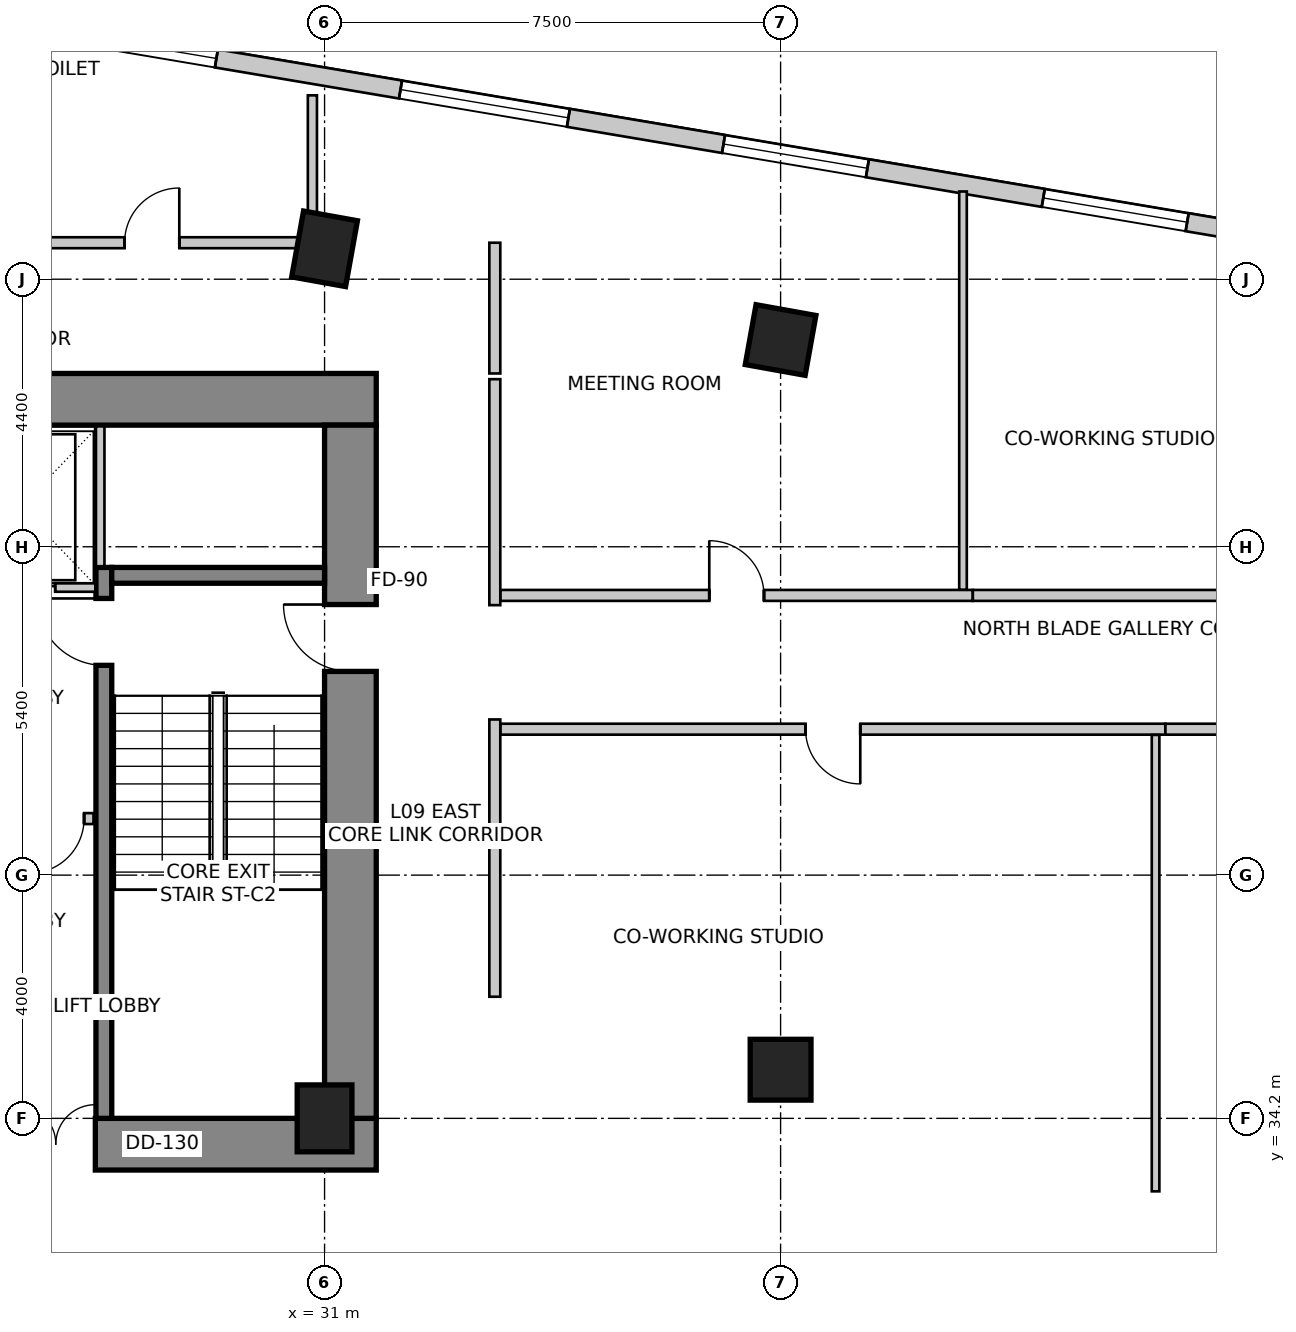
"""IFC4 building model, lengths in metres.
Left out: names, types, materials, properties, quantities, classifications, styles, units other than length and angle.
Written with IfcOpenShell. Run it as: python <this file> out.ifc"""

import sys

from ifc_helpers import new_model, si_unit, direction, frame, frame_2d, origin, origin_2d, place, context, subcontext, project, spatial, rectangle, extrude, source, transform, mapped, element, fill, save


model = new_model("IFC4")
c1 = context("Model", 3, precision=1e-05, world=origin(), true_north=direction((0.0, 1.0)))
c2 = subcontext(c1, "Body", "Model", "MODEL_VIEW")
j1 = project(units=[si_unit("LENGTHUNIT", "METRE"), si_unit("PLANEANGLEUNIT", "RADIAN")], contexts=[c1])
p1 = place(None, origin())
s1 = spatial("IfcSite", under=j1, at=p1, CompositionType="ELEMENT")
p2 = place(p1, origin())
s2 = spatial("IfcBuilding", under=s1, at=p2, CompositionType="ELEMENT")
p3 = place(p2, frame((0.0, 0.0, 39.0)))
s3 = spatial("IfcBuildingStorey", under=s2, at=p3, CompositionType="ELEMENT", Elevation=39.0)
p4 = place(p3, frame((15.75, 46.025, 0.0), z_axis=(0.0, 0.0, 1.0), x_axis=(1.0, 0.0, 0.0)))
e1 = element("IfcWall", 1, at=p4, inside=s3, PredefinedType="SHEAR", context=c2, shape_type="SweptSolid", body=[
    extrude(rectangle(XDim=16.1, YDim=0.85, at=frame_2d((8.05, 0.0))), origin(), (0.0, 0.0, 1.0), 4.0),
])
p5 = place(p3, frame((15.75, 33.775, 0.0), z_axis=(0.0, 0.0, 1.0), x_axis=(1.0, 0.0, 0.0)))
e2 = element("IfcWall", 2, at=p5, inside=s3, PredefinedType="SHEAR", context=c2, shape_type="SweptSolid", body=[
    extrude(rectangle(XDim=16.1, YDim=0.85, at=frame_2d((8.05, 0.0))), origin(), (0.0, 0.0, 1.0), 4.0),
])
m1 = source(origin(), c2, "Body", "SweptSolid", [
    extrude(rectangle(XDim=1.3, YDim=2.15, at=frame_2d((0.65, 1.075))), frame((0.0, 0.435, 0.0), z_axis=(0.0, -1.0, 0.0), x_axis=(1.0, 0.0, 0.0)), (0.0, 0.0, 1.0), 0.87),
])
p6 = place(p5, frame((10.18, 0.0, 0.0)))
e3 = element("IfcOpeningElement", 3, at=p6, cuts=e2, PredefinedType="OPENING", context=c2, shape_type="MappedRepresentation", body=[
    mapped(m1, transform((0.0, 0.0, 0.0), scale=1.0)),
])
p7 = place(p3, frame((31.425, 34.2, 0.0), z_axis=(0.0, 0.0, 1.0), x_axis=(0.0, 1.0, 0.0)))
e4 = element("IfcWall", 4, at=p7, inside=s3, PredefinedType="SHEAR", context=c2, shape_type="SweptSolid", body=[
    extrude(rectangle(XDim=11.4, YDim=0.85, at=frame_2d((5.7, 0.0))), origin(), (0.0, 0.0, 1.0), 4.0),
])
m2 = source(origin(), c2, "Body", "SweptSolid", [
    extrude(rectangle(XDim=1.1, YDim=2.15, at=frame_2d((0.55, 1.075))), frame((0.0, 0.435, 0.0), z_axis=(0.0, -1.0, 0.0), x_axis=(1.0, 0.0, 0.0)), (0.0, 0.0, 1.0), 0.87),
])
p8 = place(p7, frame((7.35, 0.0, 0.0)))
e5 = element("IfcOpeningElement", 5, at=p8, cuts=e4, PredefinedType="OPENING", context=c2, shape_type="MappedRepresentation", body=[
    mapped(m2, transform((0.0, 0.0, 0.0), scale=1.0)),
])
p9 = place(p3, frame((27.37, 34.2, 0.0), z_axis=(0.0, 0.0, 1.0), x_axis=(0.0, 1.0, 0.0)))
e6 = element("IfcWall", 6, at=p9, inside=s3, PredefinedType="SHEAR", context=c2, shape_type="SweptSolid", body=[
    extrude(rectangle(XDim=9.06, YDim=0.26, at=frame_2d((4.53, 0.0))), origin(), (0.0, 0.0, 1.0), 4.0),
])
m3 = source(origin(), c2, "Body", "SweptSolid", [
    extrude(rectangle(XDim=1.1, YDim=2.15, at=frame_2d((0.55, 1.075))), frame((0.0, 0.14, 0.0), z_axis=(0.0, -1.0, 0.0), x_axis=(1.0, 0.0, 0.0)), (0.0, 0.0, 1.0), 0.28),
])
p10 = place(p9, frame((7.45, 0.0, 0.0)))
e7 = element("IfcOpeningElement", 7, at=p10, cuts=e6, PredefinedType="OPENING", context=c2, shape_type="MappedRepresentation", body=[
    mapped(m3, transform((0.0, 0.0, 0.0), scale=1.0)),
])
p11 = place(p3, frame((27.5, 43.13, 0.0), z_axis=(0.0, 0.0, 1.0), x_axis=(1.0, 0.0, 0.0)))
e8 = element("IfcWall", 8, at=p11, inside=s3, PredefinedType="SHEAR", context=c2, shape_type="SweptSolid", body=[
    extrude(rectangle(XDim=3.5, YDim=0.26, at=frame_2d((1.75, 0.0))), origin(), (0.0, 0.0, 1.0), 4.0),
])
m4 = source(origin(), c2, "Body", "SweptSolid", [
    extrude(rectangle(XDim=0.9, YDim=1.1, at=origin_2d()), origin(), (0.0, 0.0, 1.0), 4.0),
])
p12 = place(p3, frame((31.0, 48.5, 0.0), z_axis=(0.0, 0.0, 1.0), x_axis=(0.984195607969, -0.17708474032, 0.0)))
e9 = element("IfcColumn", 9, at=p12, inside=s3, PredefinedType="COLUMN", context=c2, shape_type="MappedRepresentation", body=[
    mapped(m4, transform((0.0, 0.0, 0.0), scale=1.0)),
])
m5 = source(origin(), c2, "Body", "SweptSolid", [
    extrude(rectangle(XDim=1.0, YDim=1.0, at=origin_2d()), origin(), (0.0, 0.0, 1.0), 4.0),
])
p13 = place(p3, frame((38.5, 47.0, 0.0), z_axis=(0.0, 0.0, 1.0), x_axis=(0.984195607969, -0.17708474032, 0.0)))
e10 = element("IfcColumn", 10, at=p13, inside=s3, PredefinedType="COLUMN", context=c2, shape_type="MappedRepresentation", body=[
    mapped(m5, transform((0.0, 0.0, 0.0), scale=1.0)),
])
p14 = place(p3, frame((31.0, 34.2, 0.0), z_axis=(0.0, 0.0, 1.0), x_axis=(1.0, 0.0, 0.0)))
e11 = element("IfcColumn", 11, at=p14, inside=s3, PredefinedType="COLUMN", context=c2, shape_type="MappedRepresentation", body=[
    mapped(m4, transform((0.0, 0.0, 0.0), scale=1.0)),
])
p15 = place(p3, frame((38.5, 35.0, 0.0), z_axis=(0.0, 0.0, 1.0), x_axis=(1.0, 0.0, 0.0)))
e12 = element("IfcColumn", 12, at=p15, inside=s3, PredefinedType="COLUMN", context=c2, shape_type="MappedRepresentation", body=[
    mapped(m5, transform((0.0, 0.0, 0.0), scale=1.0)),
])
p16 = place(p3, frame((58.761, 46.648, 0.0), z_axis=(0.0, 0.0, 1.0), x_axis=(-0.98607502735, 0.166301053624, 0.0)))
e13 = element("IfcWall", 13, at=p16, inside=s3, PredefinedType="SOLIDWALL", context=c2, shape_type="SweptSolid", body=[
    extrude(rectangle(XDim=37.397, YDim=0.3, at=frame_2d((18.699, 0.0))), origin(), (0.0, 0.0, 1.0), 3.75),
])
m6 = source(origin(), c2, "Body", "SweptSolid", [
    extrude(rectangle(XDim=2.1, YDim=2.0, at=frame_2d((1.05, 1.0))), frame((0.0, 0.16, 0.0), z_axis=(0.0, -1.0, 0.0), x_axis=(1.0, 0.0, 0.0)), (0.0, 0.0, 1.0), 0.32),
])
p17 = place(p16, frame((0.626, 0.0, 0.85)))
e14 = element("IfcOpeningElement", 14, at=p17, cuts=e13, PredefinedType="OPENING", context=c2, shape_type="MappedRepresentation", body=[
    mapped(m6, transform((0.0, 0.0, 0.0), scale=1.0)),
])
m7 = source(origin(), c2, "Body", "SweptSolid", [
    extrude(rectangle(XDim=2.4, YDim=2.2, at=frame_2d((1.2, 1.1))), frame((0.0, 0.16, 0.0), z_axis=(0.0, -1.0, 0.0), x_axis=(1.0, 0.0, 0.0)), (0.0, 0.0, 1.0), 0.32),
])
p18 = place(p16, frame((4.571, 0.0, 0.85)))
e15 = element("IfcOpeningElement", 15, at=p18, cuts=e13, PredefinedType="OPENING", context=c2, shape_type="MappedRepresentation", body=[
    mapped(m7, transform((0.0, 0.0, 0.0), scale=1.0)),
])
m8 = source(origin(), c2, "Body", "SweptSolid", [
    extrude(rectangle(XDim=2.8, YDim=2.4, at=frame_2d((1.4, 1.2))), frame((0.0, 0.16, 0.0), z_axis=(0.0, -1.0, 0.0), x_axis=(1.0, 0.0, 0.0)), (0.0, 0.0, 1.0), 0.32),
])
p19 = place(p16, frame((8.969, 0.0, 0.85)))
e16 = element("IfcOpeningElement", 16, at=p19, cuts=e13, PredefinedType="OPENING", context=c2, shape_type="MappedRepresentation", body=[
    mapped(m8, transform((0.0, 0.0, 0.0), scale=1.0)),
])
p20 = place(p16, frame((13.766, 0.0, 0.85)))
e17 = element("IfcOpeningElement", 17, at=p20, cuts=e13, PredefinedType="OPENING", context=c2, shape_type="MappedRepresentation", body=[
    mapped(m7, transform((0.0, 0.0, 0.0), scale=1.0)),
])
p21 = place(p16, frame((19.099, 0.0, 0.85)))
e18 = element("IfcOpeningElement", 18, at=p21, cuts=e13, PredefinedType="OPENING", context=c2, shape_type="MappedRepresentation", body=[
    mapped(m7, transform((0.0, 0.0, 0.0), scale=1.0)),
])
p22 = place(p16, frame((24.086, 0.0, 0.85)))
e19 = element("IfcOpeningElement", 19, at=p22, cuts=e13, PredefinedType="OPENING", context=c2, shape_type="MappedRepresentation", body=[
    mapped(m8, transform((0.0, 0.0, 0.0), scale=1.0)),
])
p23 = place(p16, frame((29.957, 0.0, 0.85)))
e20 = element("IfcOpeningElement", 20, at=p23, cuts=e13, PredefinedType="OPENING", context=c2, shape_type="MappedRepresentation", body=[
    mapped(m7, transform((0.0, 0.0, 0.0), scale=1.0)),
])
p24 = place(p16, frame((34.456, 0.0, 0.85)))
e21 = element("IfcOpeningElement", 21, at=p24, cuts=e13, PredefinedType="OPENING", context=c2, shape_type="MappedRepresentation", body=[
    mapped(m7, transform((0.0, 0.0, 0.0), scale=1.0)),
])
p25 = place(p3, frame((20.37, 42.93, 0.0), z_axis=(0.0, 0.0, 1.0), x_axis=(1.0, 0.0, 0.0)))
e22 = element("IfcWall", 22, at=p25, inside=s3, PredefinedType="SOLIDWALL", context=c2, shape_type="SweptSolid", body=[
    extrude(rectangle(XDim=6.86, YDim=0.14, at=frame_2d((3.43, 0.0))), origin(), (0.0, 0.0, 1.0), 3.75),
])
m9 = source(origin(), c2, "Body", "SweptSolid", [
    extrude(rectangle(XDim=1.1, YDim=2.15, at=frame_2d((0.55, 1.075))), frame((0.0, 0.08, 0.0), z_axis=(0.0, -1.0, 0.0), x_axis=(1.0, 0.0, 0.0)), (0.0, 0.0, 1.0), 0.16),
])
p26 = place(p25, frame((0.5, 0.0, 0.0)))
e23 = element("IfcOpeningElement", 23, at=p26, cuts=e22, PredefinedType="OPENING", context=c2, shape_type="MappedRepresentation", body=[
    mapped(m9, transform((0.0, 0.0, 0.0), scale=1.0)),
])
p27 = place(p25, frame((2.7, 0.0, 0.0)))
e24 = element("IfcOpeningElement", 24, at=p27, cuts=e22, PredefinedType="OPENING", context=c2, shape_type="MappedRepresentation", body=[
    mapped(m9, transform((0.0, 0.0, 0.0), scale=1.0)),
])
p28 = place(p25, frame((5.1, 0.0, 0.0)))
e25 = element("IfcOpeningElement", 25, at=p28, cuts=e22, PredefinedType="OPENING", context=c2, shape_type="MappedRepresentation", body=[
    mapped(m9, transform((0.0, 0.0, 0.0), scale=1.0)),
])
p29 = place(p3, frame((27.31, 43.28, 0.0), z_axis=(0.0, 0.0, 1.0), x_axis=(0.0, 1.0, 0.0)))
e26 = element("IfcWall", 26, at=p29, inside=s3, PredefinedType="SOLIDWALL", context=c2, shape_type="SweptSolid", body=[
    extrude(rectangle(XDim=2.3, YDim=0.14, at=frame_2d((1.15, 0.0))), origin(), (0.0, 0.0, 1.0), 3.75),
])
p30 = place(p3, frame((27.2, 39.13, 0.0), z_axis=(0.0, 0.0, 1.0), x_axis=(-1.0, 0.0, 0.0)))
e27 = element("IfcWall", 27, at=p30, inside=s3, PredefinedType="PARTITIONING", context=c2, shape_type="SweptSolid", body=[
    extrude(rectangle(XDim=1.21, YDim=0.18, at=frame_2d((0.605, 0.0))), origin(), (0.0, 0.0, 1.0), 3.75),
])
m10 = source(origin(), c2, "Body", "SweptSolid", [
    extrude(rectangle(XDim=0.9, YDim=2.15, at=frame_2d((0.45, 1.075))), frame((0.0, 0.1, 0.0), z_axis=(0.0, -1.0, 0.0), x_axis=(1.0, 0.0, 0.0)), (0.0, 0.0, 1.0), 0.2),
])
p31 = place(p30, frame((0.155, 0.0, 0.0)))
e28 = element("IfcOpeningElement", 28, at=p31, cuts=e27, PredefinedType="OPENING", context=c2, shape_type="MappedRepresentation", body=[
    mapped(m10, transform((0.0, 0.0, 0.0), scale=1.0)),
])
p32 = place(p3, frame((25.362, 48.6, 0.0), z_axis=(0.0, 0.0, 1.0), x_axis=(1.0, 0.0, 0.0)))
e29 = element("IfcWall", 29, at=p32, inside=s3, PredefinedType="PARTITIONING", context=c2, shape_type="SweptSolid", body=[
    extrude(rectangle(XDim=5.598, YDim=0.18, at=frame_2d((2.799, 0.0))), origin(), (0.0, 0.0, 1.0), 2.892),
])
p33 = place(p32, frame((2.349, 0.0, 0.0)))
e30 = element("IfcOpeningElement", 30, at=p33, cuts=e29, PredefinedType="OPENING", context=c2, shape_type="MappedRepresentation", body=[
    mapped(m10, transform((0.0, 0.0, 0.0), scale=1.0)),
])
p34 = place(p3, frame((33.8, 48.6, 0.0), z_axis=(0.0, 0.0, 1.0), x_axis=(0.0, -1.0, 0.0)))
e31 = element("IfcWall", 31, at=p34, inside=s3, PredefinedType="PARTITIONING", context=c2, shape_type="SweptSolid", body=[
    extrude(rectangle(XDim=2.15, YDim=0.18, at=frame_2d((1.075, 0.0))), origin(), (0.0, 0.0, 1.0), 2.892),
])
p35 = place(p3, frame((33.8, 40.76, 0.0), z_axis=(0.0, 0.0, 1.0), x_axis=(0.0, -1.0, 0.0)))
e32 = element("IfcWall", 32, at=p35, inside=s3, PredefinedType="PARTITIONING", context=c2, shape_type="SweptSolid", body=[
    extrude(rectangle(XDim=4.56, YDim=0.18, at=frame_2d((2.28, 0.0))), origin(), (0.0, 0.0, 1.0), 3.75),
])
p36 = place(p3, frame((33.8, 46.356, 0.0), z_axis=(0.0, 0.0, 1.0), x_axis=(0.0, -1.0, 0.0)))
e33 = element("IfcWall", 33, at=p36, inside=s3, PredefinedType="PARTITIONING", context=c2, shape_type="SweptSolid", body=[
    extrude(rectangle(XDim=3.716, YDim=0.18, at=frame_2d((1.858, 0.0))), origin(), (0.0, 0.0, 1.0), 3.188),
])
p37 = place(p3, frame((44.827, 40.6, 0.0), z_axis=(0.0, 0.0, 1.0), x_axis=(-1.0, 0.0, 0.0)))
e34 = element("IfcWall", 34, at=p37, inside=s3, PredefinedType="PARTITIONING", context=c2, shape_type="SweptSolid", body=[
    extrude(rectangle(XDim=10.933, YDim=0.18, at=frame_2d((5.466, 0.0))), origin(), (0.0, 0.0, 1.0), 3.125),
])
p38 = place(p37, frame((5.017, 0.0, 0.0)))
e35 = element("IfcOpeningElement", 35, at=p38, cuts=e34, PredefinedType="OPENING", context=c2, shape_type="MappedRepresentation", body=[
    mapped(m10, transform((0.0, 0.0, 0.0), scale=1.0)),
])
p39 = place(p3, frame((55.535, 40.6, 0.0), z_axis=(0.0, 0.0, 1.0), x_axis=(-1.0, 0.0, 0.0)))
e36 = element("IfcWall", 36, at=p39, inside=s3, PredefinedType="PARTITIONING", context=c2, shape_type="SweptSolid", body=[
    extrude(rectangle(XDim=10.706, YDim=0.18, at=frame_2d((5.353, 0.0))), origin(), (0.0, 0.0, 1.0), 3.125),
])
p40 = place(p39, frame((4.843, 0.0, 0.0)))
e37 = element("IfcOpeningElement", 37, at=p40, cuts=e36, PredefinedType="OPENING", context=c2, shape_type="MappedRepresentation", body=[
    mapped(m10, transform((0.0, 0.0, 0.0), scale=1.0)),
])
p41 = place(p3, frame((33.894, 42.8, 0.0), z_axis=(0.0, 0.0, 1.0), x_axis=(1.0, 0.0, 0.0)))
e38 = element("IfcWall", 38, at=p41, inside=s3, PredefinedType="PARTITIONING", context=c2, shape_type="SweptSolid", body=[
    extrude(rectangle(XDim=7.766, YDim=0.18, at=frame_2d((3.883, 0.0))), origin(), (0.0, 0.0, 1.0), 3.125),
])
p42 = place(p41, frame((3.433, 0.0, 0.0)))
e39 = element("IfcOpeningElement", 39, at=p42, cuts=e38, PredefinedType="OPENING", context=c2, shape_type="MappedRepresentation", body=[
    mapped(m10, transform((0.0, 0.0, 0.0), scale=1.0)),
])
p43 = place(p3, frame((41.662, 42.8, 0.0), z_axis=(0.0, 0.0, 1.0), x_axis=(1.0, 0.0, 0.0)))
e40 = element("IfcWall", 40, at=p43, inside=s3, PredefinedType="PARTITIONING", context=c2, shape_type="SweptSolid", body=[
    extrude(rectangle(XDim=13.873, YDim=0.18, at=frame_2d((6.937, 0.0))), origin(), (0.0, 0.0, 1.0), 3.125),
])
p44 = place(p43, frame((6.426, 0.0, 0.0)))
e41 = element("IfcOpeningElement", 41, at=p44, cuts=e40, PredefinedType="OPENING", context=c2, shape_type="MappedRepresentation", body=[
    mapped(m10, transform((0.0, 0.0, 0.0), scale=1.0)),
])
p45 = place(p3, frame((44.667, 40.506, 0.0), z_axis=(0.0, 0.0, 1.0), x_axis=(0.0, -1.0, 0.0)))
e42 = element("IfcWall", 42, at=p45, inside=s3, PredefinedType="PARTITIONING", context=c2, shape_type="SweptSolid", body=[
    extrude(rectangle(XDim=7.506, YDim=0.125, at=frame_2d((3.753, 0.0))), origin(), (0.0, 0.0, 1.0), 2.892),
])
p46 = place(p3, frame((41.5, 49.443, 0.0), z_axis=(0.0, 0.0, 1.0), x_axis=(0.0, -1.0, 0.0)))
e43 = element("IfcWall", 43, at=p46, inside=s3, PredefinedType="PARTITIONING", context=c2, shape_type="SweptSolid", body=[
    extrude(rectangle(XDim=6.549, YDim=0.125, at=frame_2d((3.274, 0.0))), origin(), (0.0, 0.0, 1.0), 2.892),
])
p47 = place(p3, frame((30.8, 51.024, 0.0), z_axis=(0.0, 0.0, 1.0), x_axis=(0.0, -1.0, 0.0)))
e44 = element("IfcWall", 44, at=p47, inside=s3, PredefinedType="PARTITIONING", context=c2, shape_type="SweptSolid", body=[
    extrude(rectangle(XDim=2.204, YDim=0.15, at=frame_2d((1.102, 0.0))), origin(), (0.0, 0.0, 1.0), 3.75),
])
m11 = source(origin(), c2, "Body", "SweptSolid", [
    extrude(rectangle(XDim=2.4, YDim=2.2, at=frame_2d((1.2, 1.1))), frame((0.0, -0.015, 0.0), z_axis=(0.0, -1.0, 0.0), x_axis=(1.0, 0.0, 0.0)), (0.0, 0.0, 1.0), 0.06),
])
p48 = place(p20, origin())
e45 = element("IfcWindow", 45, at=p48, inside=s3, PartitioningType="SINGLE_PANEL", PredefinedType="WINDOW", context=c2, shape_type="MappedRepresentation", body=[
    mapped(m11, transform((0.0, 0.0, 0.0), scale=1.0)),
])
fill(e17, e45)
p49 = place(p21, origin())
e46 = element("IfcWindow", 46, at=p49, inside=s3, PartitioningType="SINGLE_PANEL", PredefinedType="WINDOW", context=c2, shape_type="MappedRepresentation", body=[
    mapped(m11, transform((0.0, 0.0, 0.0), scale=1.0)),
])
fill(e18, e46)
m12 = source(origin(), c2, "Body", "SweptSolid", [
    extrude(rectangle(XDim=2.8, YDim=2.4, at=frame_2d((1.4, 1.2))), frame((0.0, -0.015, 0.0), z_axis=(0.0, -1.0, 0.0), x_axis=(1.0, 0.0, 0.0)), (0.0, 0.0, 1.0), 0.06),
])
p50 = place(p22, origin())
e47 = element("IfcWindow", 47, at=p50, inside=s3, PartitioningType="SINGLE_PANEL", PredefinedType="WINDOW", context=c2, shape_type="MappedRepresentation", body=[
    mapped(m12, transform((0.0, 0.0, 0.0), scale=1.0)),
])
fill(e19, e47)
p51 = place(p23, origin())
e48 = element("IfcWindow", 48, at=p51, inside=s3, PartitioningType="SINGLE_PANEL", PredefinedType="WINDOW", context=c2, shape_type="MappedRepresentation", body=[
    mapped(m11, transform((0.0, 0.0, 0.0), scale=1.0)),
])
fill(e20, e48)
m13 = source(origin(), c2, "Body", "SweptSolid", [
    extrude(rectangle(XDim=1.1, YDim=2.15, at=frame_2d((0.55, 1.075))), frame((0.0, 0.025, 0.0), z_axis=(0.0, -1.0, 0.0), x_axis=(1.0, 0.0, 0.0)), (0.0, 0.0, 1.0), 0.05),
])
p52 = place(p28, origin())
e49 = element("IfcDoor", 49, at=p52, inside=s3, OperationType="SLIDING_TO_LEFT", PredefinedType="DOOR", context=c2, shape_type="MappedRepresentation", body=[
    mapped(m13, transform((0.0, 0.0, 0.0), scale=1.0)),
])
fill(e25, e49)
m14 = source(origin(), c2, "Body", "SweptSolid", [
    extrude(rectangle(XDim=1.1, YDim=2.15, at=frame_2d((0.55, 1.075))), frame((0.0, 0.025, 0.0), z_axis=(0.0, -1.0, 0.0), x_axis=(1.0, 0.0, 0.0)), (0.0, 0.0, 1.0), 0.05),
])
p53 = place(p10, origin())
e50 = element("IfcDoor", 50, at=p53, inside=s3, OperationType="SINGLE_SWING_RIGHT", PredefinedType="DOOR", context=c2, shape_type="MappedRepresentation", body=[
    mapped(m14, transform((0.0, 0.0, 0.0), scale=1.0)),
])
fill(e7, e50)
p54 = place(p8, origin())
e51 = element("IfcDoor", 51, at=p54, inside=s3, OperationType="SINGLE_SWING_RIGHT", PredefinedType="DOOR", context=c2, shape_type="MappedRepresentation", body=[
    mapped(m14, transform((0.0, 0.0, 0.0), scale=1.0)),
])
fill(e5, e51)
m15 = source(origin(), c2, "Body", "SweptSolid", [
    extrude(rectangle(XDim=1.3, YDim=2.15, at=frame_2d((0.65, 1.075))), frame((0.0, 0.025, 0.0), z_axis=(0.0, -1.0, 0.0), x_axis=(1.0, 0.0, 0.0)), (0.0, 0.0, 1.0), 0.05),
])
p55 = place(p6, origin())
e52 = element("IfcDoor", 52, at=p55, inside=s3, OperationType="DOUBLE_DOOR_SINGLE_SWING", PredefinedType="DOOR", context=c2, shape_type="MappedRepresentation", body=[
    mapped(m15, transform((0.0, 0.0, 0.0), scale=1.0)),
])
fill(e3, e52)
m16 = source(origin(), c2, "Body", "SweptSolid", [
    extrude(rectangle(XDim=0.9, YDim=2.15, at=frame_2d((0.45, 1.075))), frame((0.0, 0.025, 0.0), z_axis=(0.0, -1.0, 0.0), x_axis=(1.0, 0.0, 0.0)), (0.0, 0.0, 1.0), 0.05),
])
p56 = place(p31, origin())
e53 = element("IfcDoor", 53, at=p56, inside=s3, OperationType="SINGLE_SWING_RIGHT", PredefinedType="DOOR", context=c2, shape_type="MappedRepresentation", body=[
    mapped(m16, transform((0.0, 0.0, 0.0), scale=1.0)),
])
fill(e28, e53)
m17 = source(origin(), c2, "Body", "SweptSolid", [
    extrude(rectangle(XDim=0.9, YDim=2.15, at=frame_2d((0.45, 1.075))), frame((0.0, 0.025, 0.0), z_axis=(0.0, -1.0, 0.0), x_axis=(1.0, 0.0, 0.0)), (0.0, 0.0, 1.0), 0.05),
])
p57 = place(p33, origin())
e54 = element("IfcDoor", 54, at=p57, inside=s3, OperationType="SINGLE_SWING_RIGHT", PredefinedType="DOOR", context=c2, shape_type="MappedRepresentation", body=[
    mapped(m17, transform((0.0, 0.0, 0.0), scale=1.0)),
])
fill(e30, e54)
p58 = place(p38, origin())
e55 = element("IfcDoor", 55, at=p58, inside=s3, OperationType="SINGLE_SWING_LEFT", PredefinedType="DOOR", context=c2, shape_type="MappedRepresentation", body=[
    mapped(m17, transform((0.0, 0.0, 0.0), scale=1.0)),
])
fill(e35, e55)
p59 = place(p42, origin())
e56 = element("IfcDoor", 56, at=p59, inside=s3, OperationType="SINGLE_SWING_LEFT", PredefinedType="DOOR", context=c2, shape_type="MappedRepresentation", body=[
    mapped(m17, transform((0.0, 0.0, 0.0), scale=1.0)),
])
fill(e39, e56)
save(model, sys.argv[1])
